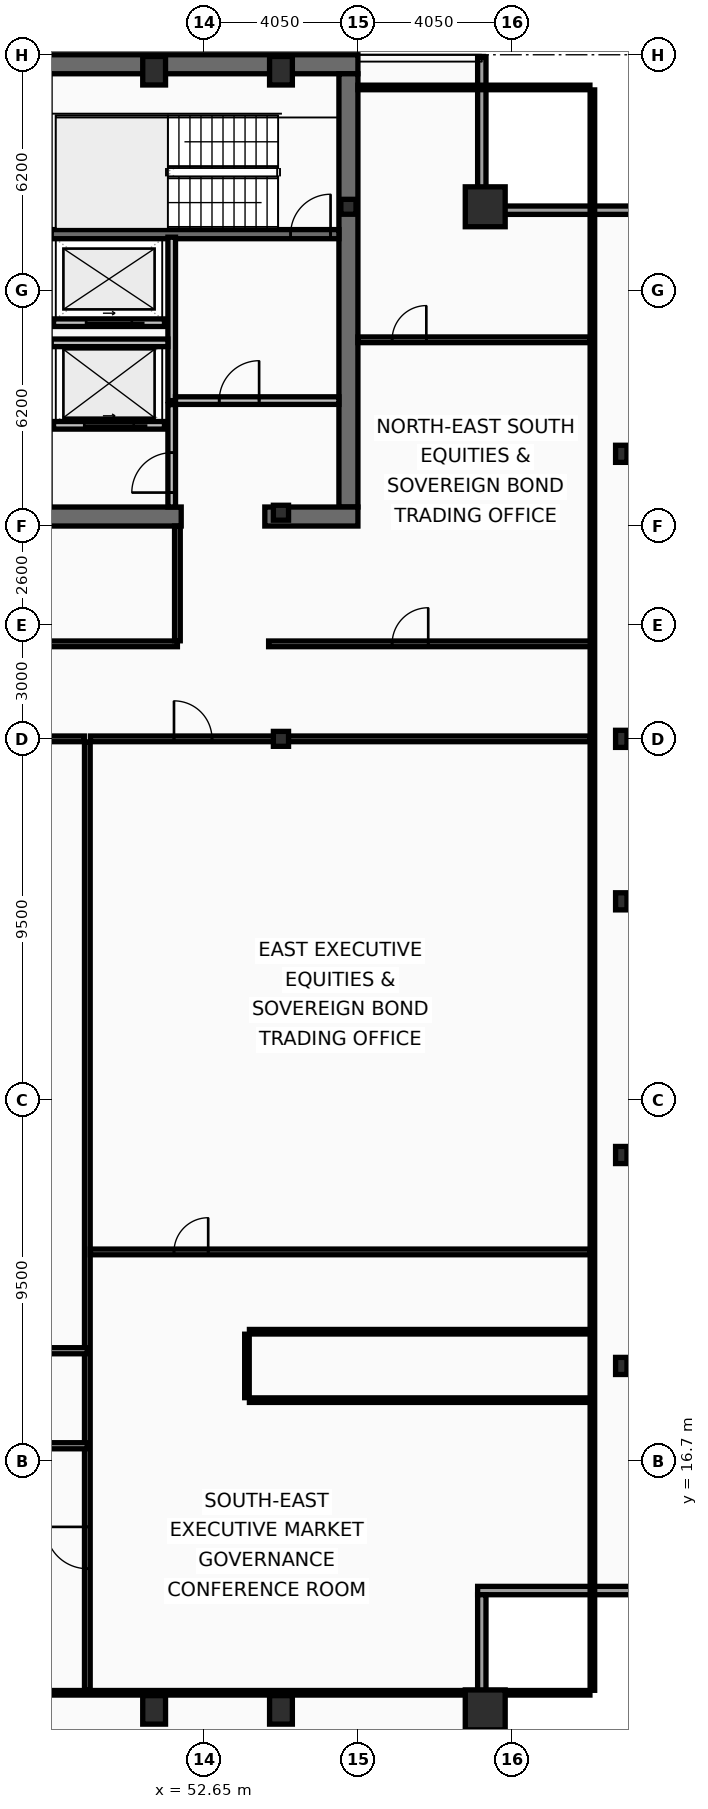
"""IFC4 building model, lengths in metres.
Left out: names, types, materials, properties, quantities, classifications, styles, units other than length and angle.
Written with IfcOpenShell. Run it as: python <this file> out.ifc"""

import sys

from ifc_helpers import new_model, si_unit, direction, frame, frame_2d, origin, origin_2d, place, context, subcontext, project, spatial, rectangle, hollow_rectangle, i_section, extrude, element, fill, save


model = new_model("IFC4")
c1 = context("Model", 3, precision=1e-05, world=origin(), true_north=direction((0.0, 1.0)))
c2 = subcontext(c1, "Body", "Model", "MODEL_VIEW")
j1 = project(units=[si_unit("LENGTHUNIT", "METRE"), si_unit("PLANEANGLEUNIT", "RADIAN")], contexts=[c1])
p1 = place(None, origin())
s1 = spatial("IfcSite", under=j1, at=p1, CompositionType="ELEMENT")
p2 = place(p1, origin())
s2 = spatial("IfcBuilding", under=s1, at=p2, CompositionType="ELEMENT")
p3 = place(p2, frame((0.0, 0.0, 287.8)))
s3 = spatial("IfcBuildingStorey", under=s2, at=p3, CompositionType="ELEMENT", Elevation=287.8)
p4 = place(p3, frame((16.2, 53.45, 0.0), z_axis=(0.0, 0.0, 1.0), x_axis=(1.0, 0.0, 0.0)))
e1 = element("IfcWall", 1, at=p4, inside=s3, PredefinedType="SHEAR", context=c2, shape_type="SweptSolid", body=[
    extrude(rectangle(XDim=40.5, YDim=0.5, at=frame_2d((20.25, 0.0))), origin(), (0.0, 0.0, 1.0), 3.44),
])
p5 = place(p3, frame((56.45, 53.2, 0.0), z_axis=(0.0, 0.0, 1.0), x_axis=(0.0, -1.0, 0.0)))
e2 = element("IfcWall", 2, at=p5, inside=s3, PredefinedType="SHEAR", context=c2, shape_type="SweptSolid", body=[
    extrude(rectangle(XDim=11.4, YDim=0.5, at=frame_2d((5.7, 0.0))), origin(), (0.0, 0.0, 1.0), 3.44),
])
p6 = place(p3, frame((52.05, 41.55, 0.0), z_axis=(0.0, 0.0, 1.0), x_axis=(-1.0, 0.0, 0.0)))
e3 = element("IfcWall", 3, at=p6, inside=s3, PredefinedType="SHEAR", context=c2, shape_type="SweptSolid", body=[
    extrude(rectangle(XDim=11.3, YDim=0.5, at=frame_2d((5.65, 0.0))), origin(), (0.0, 0.0, 1.0), 3.44),
])
p7 = place(p3, frame((56.7, 41.55, 0.0), z_axis=(0.0, 0.0, 1.0), x_axis=(-1.0, 0.0, 0.0)))
e4 = element("IfcWall", 4, at=p7, inside=s3, PredefinedType="SHEAR", context=c2, shape_type="SweptSolid", body=[
    extrude(rectangle(XDim=2.45, YDim=0.5, at=frame_2d((1.225, 0.0))), origin(), (0.0, 0.0, 1.0), 3.44),
])
p8 = place(p3, frame((48.63, 48.98, 0.0), z_axis=(0.0, 0.0, 1.0), x_axis=(1.0, 0.0, 0.0)))
e5 = element("IfcWall", 5, at=p8, inside=s3, PredefinedType="SHEAR", context=c2, shape_type="SweptSolid", body=[
    extrude(rectangle(XDim=7.57, YDim=0.24, at=frame_2d((3.785, 0.0))), origin(), (0.0, 0.0, 1.0), 3.44),
])
p9 = place(p8, frame((6.3, 0.0, 0.0)))
e6 = element("IfcOpeningElement", 6, at=p9, cuts=e5, PredefinedType="OPENING", context=c2, shape_type="SweptSolid", body=[
    extrude(rectangle(XDim=1.05, YDim=2.15, at=frame_2d((0.525, 1.075))), frame((0.0, 0.13, 0.0), z_axis=(0.0, -1.0, 0.0), x_axis=(1.0, 0.0, 0.0)), (0.0, 0.0, 1.0), 0.26),
])
for number, where, z_axis, x_axis in (
    (7, (60.05, 10.15, 0.0), (0.0, 0.0, 1.0), (1.0, 0.0, 0.0)),
    (8, (60.05, 49.7, 0.0), (0.0, 0.0, 1.0), (1.0, 0.0, 0.0)),
):
    element("IfcColumn", number, at=place(p3, frame(where, z_axis=z_axis, x_axis=x_axis)), inside=s3, PredefinedType="COLUMN", context=c2, shape_type="SweptSolid", body=[
        extrude(hollow_rectangle(XDim=1.05, YDim=1.05, WallThickness=0.055, at=origin_2d()), origin(), (0.0, 0.0, 1.0), 3.6),
    ])
for number, where, z_axis, x_axis in (
    (9, (51.337, 10.15, 0.0), (0.0, 0.0, 1.0), (1.0, 0.0, 0.0)),
    (10, (54.675, 10.15, 0.0), (0.0, 0.0, 1.0), (1.0, 0.0, 0.0)),
    (11, (51.337, 53.28, 0.0), (0.0, 0.0, 1.0), (1.0, 0.0, 0.0)),
    (12, (54.675, 53.28, 0.0), (0.0, 0.0, 1.0), (1.0, 0.0, 0.0)),
):
    element("IfcColumn", number, at=place(p3, frame(where, z_axis=z_axis, x_axis=x_axis)), inside=s3, PredefinedType="COLUMN", context=c2, shape_type="SweptSolid", body=[
        extrude(hollow_rectangle(XDim=0.6, YDim=0.75, WallThickness=0.045, at=origin_2d()), origin(), (0.0, 0.0, 1.0), 3.6),
    ])
for number, where, z_axis, x_axis in (
    (13, (63.63, 19.2, 0.0), (0.0, 0.0, 1.0), (1.0, 0.0, 0.0)),
    (14, (63.63, 24.75, 0.0), (0.0, 0.0, 1.0), (1.0, 0.0, 0.0)),
    (15, (63.63, 31.425, 0.0), (0.0, 0.0, 1.0), (1.0, 0.0, 0.0)),
    (16, (63.63, 35.7, 0.0), (0.0, 0.0, 1.0), (1.0, 0.0, 0.0)),
    (17, (63.63, 43.2, 0.0), (0.0, 0.0, 1.0), (1.0, 0.0, 0.0)),
):
    element("IfcColumn", number, at=place(p3, frame(where, z_axis=z_axis, x_axis=x_axis)), inside=s3, PredefinedType="COLUMN", context=c2, shape_type="SweptSolid", body=[
        extrude(i_section(OverallWidth=0.3, OverallDepth=0.45, WebThickness=0.014, FlangeThickness=0.026, at=origin_2d()), origin(), (0.0, 0.0, 1.0), 3.6),
    ])
for number, where, z_axis, x_axis in (
    (18, (56.45, 49.7, 0.0), (0.0, 0.0, 1.0), (1.0, 0.0, 0.0)),
    (19, (54.675, 35.7, 0.0), (0.0, 0.0, 1.0), (1.0, 0.0, 0.0)),
    (20, (54.675, 41.65, 0.0), (0.0, 0.0, 1.0), (1.0, 0.0, 0.0)),
):
    element("IfcColumn", number, at=place(p3, frame(where, z_axis=z_axis, x_axis=x_axis)), inside=s3, PredefinedType="COLUMN", context=c2, shape_type="SweptSolid", body=[
        extrude(i_section(OverallWidth=0.399, OverallDepth=0.393, WebThickness=0.023, FlangeThickness=0.037, at=origin_2d()), origin(), (0.0, 0.0, 1.0), 3.6),
    ])
p10 = place(p3, frame((59.96, 53.63, 0.0), z_axis=(0.0, 0.0, 1.0), x_axis=(0.0, -1.0, 0.0)))
e21 = element("IfcWall", 21, at=p10, inside=s3, PredefinedType="SOLIDWALL", context=c2, shape_type="SweptSolid", body=[
    extrude(rectangle(XDim=3.91, YDim=0.22, at=frame_2d((1.955, 0.0))), origin(), (0.0, 0.0, 1.0), 2.09),
])
p11 = place(p3, frame((59.85, 49.61, 0.0), z_axis=(0.0, 0.0, 1.0), x_axis=(1.0, 0.0, 0.0)))
e22 = element("IfcWall", 22, at=p11, inside=s3, PredefinedType="SOLIDWALL", context=c2, shape_type="SweptSolid", body=[
    extrude(rectangle(XDim=4.13, YDim=0.22, at=frame_2d((2.065, 0.0))), origin(), (0.0, 0.0, 1.0), 2.09),
])
p12 = place(p3, frame((63.98, 13.29, 0.0), z_axis=(0.0, 0.0, 1.0), x_axis=(-1.0, 0.0, 0.0)))
e23 = element("IfcWall", 23, at=p12, inside=s3, PredefinedType="SOLIDWALL", context=c2, shape_type="SweptSolid", body=[
    extrude(rectangle(XDim=4.13, YDim=0.22, at=frame_2d((2.065, 0.0))), origin(), (0.0, 0.0, 1.0), 2.88),
])
p13 = place(p3, frame((59.96, 13.18, 0.0), z_axis=(0.0, 0.0, 1.0), x_axis=(0.0, -1.0, 0.0)))
e24 = element("IfcWall", 24, at=p13, inside=s3, PredefinedType="SOLIDWALL", context=c2, shape_type="SweptSolid", body=[
    extrude(rectangle(XDim=3.91, YDim=0.22, at=frame_2d((1.955, 0.0))), origin(), (0.0, 0.0, 1.0), 2.09),
])
p14 = place(p3, frame((51.61, 43.95, 0.0), z_axis=(0.0, 0.0, 1.0), x_axis=(-1.0, 0.0, 0.0)))
e25 = element("IfcWall", 25, at=p14, inside=s3, PredefinedType="PARTITIONING", context=c2, shape_type="SweptSolid", body=[
    extrude(rectangle(XDim=2.92, YDim=0.2, at=frame_2d((1.46, 0.0))), origin(), (0.0, 0.0, 1.0), 3.44),
])
p15 = place(p14, frame((0.81, 0.0, 0.0)))
e26 = element("IfcOpeningElement", 26, at=p15, cuts=e25, PredefinedType="OPENING", context=c2, shape_type="SweptSolid", body=[
    extrude(rectangle(XDim=1.3, YDim=2.18, at=frame_2d((0.65, 1.09))), frame((0.0, 0.11, 0.0), z_axis=(0.0, -1.0, 0.0), x_axis=(1.0, 0.0, 0.0)), (0.0, 0.0, 1.0), 0.22),
])
p16 = place(p3, frame((51.61, 46.65, 0.0), z_axis=(0.0, 0.0, 1.0), x_axis=(-1.0, 0.0, 0.0)))
e27 = element("IfcWall", 27, at=p16, inside=s3, PredefinedType="PARTITIONING", context=c2, shape_type="SweptSolid", body=[
    extrude(rectangle(XDim=2.92, YDim=0.2, at=frame_2d((1.46, 0.0))), origin(), (0.0, 0.0, 1.0), 3.44),
])
p17 = place(p16, frame((0.86, 0.0, 0.0)))
e28 = element("IfcOpeningElement", 28, at=p17, cuts=e27, PredefinedType="OPENING", context=c2, shape_type="SweptSolid", body=[
    extrude(rectangle(XDim=1.2, YDim=2.18, at=frame_2d((0.6, 1.09))), frame((0.0, 0.11, 0.0), z_axis=(0.0, -1.0, 0.0), x_axis=(1.0, 0.0, 0.0)), (0.0, 0.0, 1.0), 0.22),
])
p18 = place(p3, frame((51.8, 44.6, 0.0), z_axis=(0.0, 0.0, 1.0), x_axis=(0.0, 1.0, 0.0)))
e29 = element("IfcWall", 29, at=p18, inside=s3, PredefinedType="PARTITIONING", context=c2, shape_type="SweptSolid", body=[
    extrude(rectangle(XDim=4.3, YDim=0.2, at=frame_2d((2.15, 0.0))), origin(), (0.0, 0.0, 1.0), 3.44),
])
p19 = place(p3, frame((51.9, 44.6, 0.0), z_axis=(0.0, 0.0, 1.0), x_axis=(1.0, 0.0, 0.0)))
e30 = element("IfcWall", 30, at=p19, inside=s3, PredefinedType="PARTITIONING", context=c2, shape_type="SweptSolid", body=[
    extrude(rectangle(XDim=4.3, YDim=0.2, at=frame_2d((2.15, 0.0))), origin(), (0.0, 0.0, 1.0), 3.44),
])
p20 = place(p19, frame((1.15, 0.0, 0.0)))
e31 = element("IfcOpeningElement", 31, at=p20, cuts=e30, PredefinedType="OPENING", context=c2, shape_type="SweptSolid", body=[
    extrude(rectangle(XDim=1.05, YDim=2.15, at=frame_2d((0.525, 1.075))), frame((0.0, 0.11, 0.0), z_axis=(0.0, -1.0, 0.0), x_axis=(1.0, 0.0, 0.0)), (0.0, 0.0, 1.0), 0.22),
])
p21 = place(p3, frame((48.63, 46.12, 0.0), z_axis=(0.0, 0.0, 1.0), x_axis=(1.0, 0.0, 0.0)))
e32 = element("IfcWall", 32, at=p21, inside=s3, PredefinedType="PARTITIONING", context=c2, shape_type="SweptSolid", body=[
    extrude(rectangle(XDim=3.07, YDim=0.2, at=frame_2d((1.535, 0.0))), origin(), (0.0, 0.0, 1.0), 3.44),
])
p22 = place(p3, frame((51.8, 41.8, 0.0), z_axis=(0.0, 0.0, 1.0), x_axis=(0.0, 1.0, 0.0)))
e33 = element("IfcWall", 33, at=p22, inside=s3, PredefinedType="PARTITIONING", context=c2, shape_type="SweptSolid", body=[
    extrude(rectangle(XDim=2.695, YDim=0.2, at=frame_2d((1.348, 0.0))), origin(), (0.0, 0.0, 1.0), 3.44),
])
p23 = place(p22, frame((0.38, 0.0, 0.0)))
e34 = element("IfcOpeningElement", 34, at=p23, cuts=e33, PredefinedType="OPENING", context=c2, shape_type="SweptSolid", body=[
    extrude(rectangle(XDim=1.05, YDim=2.15, at=frame_2d((0.525, 1.075))), frame((0.0, 0.11, 0.0), z_axis=(0.0, -1.0, 0.0), x_axis=(1.0, 0.0, 0.0)), (0.0, 0.0, 1.0), 0.22),
])
p24 = place(p3, frame((46.3, 38.2, 0.0), z_axis=(0.0, 0.0, 1.0), x_axis=(1.0, 0.0, 0.0)))
e35 = element("IfcWall", 35, at=p24, inside=s3, PredefinedType="PARTITIONING", context=c2, shape_type="SweptSolid", body=[
    extrude(rectangle(XDim=5.65, YDim=0.15, at=frame_2d((2.825, 0.0))), origin(), (0.0, 0.0, 1.0), 2.78),
])
p25 = place(p24, frame((1.1, 0.0, 0.0)))
e36 = element("IfcOpeningElement", 36, at=p25, cuts=e35, PredefinedType="OPENING", context=c2, shape_type="SweptSolid", body=[
    extrude(rectangle(XDim=1.0, YDim=2.05, at=frame_2d((0.5, 1.025))), frame((0.0, 0.085, 0.0), z_axis=(0.0, -1.0, 0.0), x_axis=(1.0, 0.0, 0.0)), (0.0, 0.0, 1.0), 0.17),
])
p26 = place(p3, frame((51.95, 38.28, 0.0), z_axis=(0.0, 0.0, 1.0), x_axis=(0.0, 1.0, 0.0)))
e37 = element("IfcWall", 37, at=p26, inside=s3, PredefinedType="PARTITIONING", context=c2, shape_type="SweptSolid", body=[
    extrude(rectangle(XDim=3.02, YDim=0.15, at=frame_2d((1.51, 0.0))), origin(), (0.0, 0.0, 1.0), 3.44),
])
p27 = place(p3, frame((54.35, 38.2, 0.0), z_axis=(0.0, 0.0, 1.0), x_axis=(1.0, 0.0, 0.0)))
e38 = element("IfcWall", 38, at=p27, inside=s3, PredefinedType="PARTITIONING", context=c2, shape_type="SweptSolid", body=[
    extrude(rectangle(XDim=8.52, YDim=0.15, at=frame_2d((4.26, 0.0))), origin(), (0.0, 0.0, 1.0), 2.78),
])
p28 = place(p27, frame((3.25, 0.0, 0.0)))
e39 = element("IfcOpeningElement", 39, at=p28, cuts=e38, PredefinedType="OPENING", context=c2, shape_type="SweptSolid", body=[
    extrude(rectangle(XDim=0.95, YDim=2.05, at=frame_2d((0.475, 1.025))), frame((0.0, 0.085, 0.0), z_axis=(0.0, -1.0, 0.0), x_axis=(1.0, 0.0, 0.0)), (0.0, 0.0, 1.0), 0.17),
])
p29 = place(p3, frame((56.7, 46.2, 0.0), z_axis=(0.0, 0.0, 1.0), x_axis=(1.0, 0.0, 0.0)))
e40 = element("IfcWall", 40, at=p29, inside=s3, PredefinedType="PARTITIONING", context=c2, shape_type="SweptSolid", body=[
    extrude(rectangle(XDim=6.105, YDim=0.15, at=frame_2d((3.052, 0.0))), origin(), (0.0, 0.0, 1.0), 2.88),
])
p30 = place(p29, frame((0.9, 0.0, 0.0)))
e41 = element("IfcOpeningElement", 41, at=p30, cuts=e40, PredefinedType="OPENING", context=c2, shape_type="SweptSolid", body=[
    extrude(rectangle(XDim=0.9, YDim=2.05, at=frame_2d((0.45, 1.025))), frame((0.0, 0.085, 0.0), z_axis=(0.0, -1.0, 0.0), x_axis=(1.0, 0.0, 0.0)), (0.0, 0.0, 1.0), 0.17),
])
p31 = place(p3, frame((49.58, 10.665, 0.0), z_axis=(0.0, 0.0, 1.0), x_axis=(0.0, 1.0, 0.0)))
e42 = element("IfcWall", 42, at=p31, inside=s3, PredefinedType="PARTITIONING", context=c2, shape_type="SweptSolid", body=[
    extrude(rectangle(XDim=24.955, YDim=0.15, at=frame_2d((12.478, 0.0))), origin(), (0.0, 0.0, 1.0), 3.03),
])
p32 = place(p31, frame((3.2, 0.0, 0.0)))
e43 = element("IfcOpeningElement", 43, at=p32, cuts=e42, PredefinedType="OPENING", context=c2, shape_type="SweptSolid", body=[
    extrude(rectangle(XDim=1.1, YDim=2.1, at=frame_2d((0.55, 1.05))), frame((0.0, 0.085, 0.0), z_axis=(0.0, -1.0, 0.0), x_axis=(1.0, 0.0, 0.0)), (0.0, 0.0, 1.0), 0.17),
])
p33 = place(p3, frame((24.48, 35.7, 0.0), z_axis=(0.0, 0.0, 1.0), x_axis=(1.0, 0.0, 0.0)))
e44 = element("IfcWall", 44, at=p33, inside=s3, PredefinedType="PARTITIONING", context=c2, shape_type="SweptSolid", body=[
    extrude(rectangle(XDim=25.02, YDim=0.15, at=frame_2d((12.51, 0.0))), origin(), (0.0, 0.0, 1.0), 2.78),
])
p34 = place(p3, frame((49.66, 35.7, 0.0), z_axis=(0.0, 0.0, 1.0), x_axis=(1.0, 0.0, 0.0)))
e45 = element("IfcWall", 45, at=p34, inside=s3, PredefinedType="PARTITIONING", context=c2, shape_type="SweptSolid", body=[
    extrude(rectangle(XDim=13.145, YDim=0.15, at=frame_2d((6.573, 0.0))), origin(), (0.0, 0.0, 1.0), 2.09),
])
p35 = place(p34, frame((2.2, 0.0, 0.0)))
e46 = element("IfcOpeningElement", 46, at=p35, cuts=e45, PredefinedType="OPENING", context=c2, shape_type="SweptSolid", body=[
    extrude(rectangle(XDim=1.0, YDim=2.05, at=frame_2d((0.5, 1.025))), frame((0.0, 0.085, 0.0), z_axis=(0.0, -1.0, 0.0), x_axis=(1.0, 0.0, 0.0)), (0.0, 0.0, 1.0), 0.17),
])
p36 = place(p3, frame((49.66, 22.2, 0.0), z_axis=(0.0, 0.0, 1.0), x_axis=(1.0, 0.0, 0.0)))
e47 = element("IfcWall", 47, at=p36, inside=s3, PredefinedType="PARTITIONING", context=c2, shape_type="SweptSolid", body=[
    extrude(rectangle(XDim=13.145, YDim=0.15, at=frame_2d((6.573, 0.0))), origin(), (0.0, 0.0, 1.0), 2.53),
])
p37 = place(p36, frame((2.2, 0.0, 0.0)))
e48 = element("IfcOpeningElement", 48, at=p37, cuts=e47, PredefinedType="OPENING", context=c2, shape_type="SweptSolid", body=[
    extrude(rectangle(XDim=0.9, YDim=2.05, at=frame_2d((0.45, 1.025))), frame((0.0, 0.085, 0.0), z_axis=(0.0, -1.0, 0.0), x_axis=(1.0, 0.0, 0.0)), (0.0, 0.0, 1.0), 0.17),
])
p38 = place(p3, frame((40.855, 19.6, 0.0), z_axis=(0.0, 0.0, 1.0), x_axis=(1.0, 0.0, 0.0)))
e49 = element("IfcWall", 49, at=p38, inside=s3, PredefinedType="PARTITIONING", context=c2, shape_type="SweptSolid", body=[
    extrude(rectangle(XDim=8.725, YDim=0.16, at=frame_2d((4.363, 0.0))), origin(), (0.0, 0.0, 1.0), 2.78),
])
p39 = place(p38, frame((4.165, 0.0, 0.0)))
e50 = element("IfcOpeningElement", 50, at=p39, cuts=e49, PredefinedType="OPENING", context=c2, shape_type="SweptSolid", body=[
    extrude(rectangle(XDim=1.0, YDim=2.05, at=frame_2d((0.5, 1.025))), frame((0.0, 0.09, 0.0), z_axis=(0.0, -1.0, 0.0), x_axis=(1.0, 0.0, 0.0)), (0.0, 0.0, 1.0), 0.18),
])
p40 = place(p3, frame((39.024, 17.1, 0.0), z_axis=(0.0, 0.0, 1.0), x_axis=(1.0, 0.0, 0.0)))
e51 = element("IfcWall", 51, at=p40, inside=s3, PredefinedType="PARTITIONING", context=c2, shape_type="SweptSolid", body=[
    extrude(rectangle(XDim=10.556, YDim=0.16, at=frame_2d((5.278, 0.0))), origin(), (0.0, 0.0, 1.0), 2.78),
])
p41 = place(p40, frame((4.934, 0.0, 0.0)))
e52 = element("IfcOpeningElement", 52, at=p41, cuts=e51, PredefinedType="OPENING", context=c2, shape_type="SweptSolid", body=[
    extrude(rectangle(XDim=1.0, YDim=2.05, at=frame_2d((0.5, 1.025))), frame((0.0, 0.09, 0.0), z_axis=(0.0, -1.0, 0.0), x_axis=(1.0, 0.0, 0.0)), (0.0, 0.0, 1.0), 0.18),
])
p42 = place(p3, frame((62.87, 10.665, 0.0), z_axis=(0.0, 0.0, 1.0), x_axis=(0.0, 1.0, 0.0)))
e53 = element("IfcWall", 53, at=p42, inside=s3, PredefinedType="PARTITIONING", context=c2, shape_type="SweptSolid", body=[
    extrude(rectangle(XDim=42.11, YDim=0.12, at=frame_2d((21.055, 0.0))), origin(), (0.0, 0.0, 1.0), 1.83),
])
p43 = place(p3, frame((56.7, 52.84, 0.0), z_axis=(0.0, 0.0, 1.0), x_axis=(1.0, 0.0, 0.0)))
e54 = element("IfcWall", 54, at=p43, inside=s3, PredefinedType="PARTITIONING", context=c2, shape_type="SweptSolid", body=[
    extrude(rectangle(XDim=6.105, YDim=0.12, at=frame_2d((3.052, 0.0))), origin(), (0.0, 0.0, 1.0), 3.44),
])
p44 = place(p3, frame((10.095, 10.6, 0.0), z_axis=(0.0, 0.0, 1.0), x_axis=(1.0, 0.0, 0.0)))
e55 = element("IfcWall", 55, at=p44, inside=s3, PredefinedType="PARTITIONING", context=c2, shape_type="SweptSolid", body=[
    extrude(rectangle(XDim=52.71, YDim=0.12, at=frame_2d((26.355, 0.0))), origin(), (0.0, 0.0, 1.0), 2.09),
])
for number, where, z_axis, x_axis in (
    (56, (53.845, 18.3, 0.0), (0.0, 0.0, 1.0), (1.0, 0.0, 0.0)),
    (57, (53.845, 20.1, 0.0), (0.0, 0.0, 1.0), (1.0, 0.0, 0.0)),
):
    element("IfcWall", number, at=place(p3, frame(where, z_axis=z_axis, x_axis=x_axis)), inside=s3, PredefinedType="PARTITIONING", context=c2, shape_type="SweptSolid", body=[
        extrude(rectangle(XDim=8.96, YDim=0.12, at=frame_2d((4.48, 0.0))), origin(), (0.0, 0.0, 1.0), 2.53),
    ])
p45 = place(p3, frame((53.78, 18.365, 0.0), z_axis=(0.0, 0.0, 1.0), x_axis=(0.0, 1.0, 0.0)))
e58 = element("IfcWall", 58, at=p45, inside=s3, PredefinedType="PARTITIONING", context=c2, shape_type="SweptSolid", body=[
    extrude(rectangle(XDim=1.67, YDim=0.12, at=frame_2d((0.835, 0.0))), origin(), (0.0, 0.0, 1.0), 3.44),
])
p46 = place(p9, origin())
e59 = element("IfcDoor", 59, at=p46, inside=s3, OperationType="SINGLE_SWING_RIGHT", PredefinedType="DOOR", context=c2, shape_type="SweptSolid", body=[
    extrude(rectangle(XDim=1.05, YDim=2.15, at=frame_2d((0.525, 1.075))), frame((0.0, 0.025, 0.0), z_axis=(0.0, -1.0, 0.0), x_axis=(1.0, 0.0, 0.0)), (0.0, 0.0, 1.0), 0.05),
])
fill(e6, e59)
p47 = place(p15, origin())
e60 = element("IfcDoor", 60, at=p47, inside=s3, OperationType="SLIDING_TO_LEFT", PredefinedType="DOOR", context=c2, shape_type="SweptSolid", body=[
    extrude(rectangle(XDim=1.3, YDim=2.18, at=frame_2d((0.65, 1.09))), frame((0.0, 0.025, 0.0), z_axis=(0.0, -1.0, 0.0), x_axis=(1.0, 0.0, 0.0)), (0.0, 0.0, 1.0), 0.05),
])
fill(e26, e60)
p48 = place(p17, origin())
e61 = element("IfcDoor", 61, at=p48, inside=s3, OperationType="SLIDING_TO_LEFT", PredefinedType="DOOR", context=c2, shape_type="SweptSolid", body=[
    extrude(rectangle(XDim=1.2, YDim=2.18, at=frame_2d((0.6, 1.09))), frame((0.0, 0.025, 0.0), z_axis=(0.0, -1.0, 0.0), x_axis=(1.0, 0.0, 0.0)), (0.0, 0.0, 1.0), 0.05),
])
fill(e28, e61)
p49 = place(p20, origin())
e62 = element("IfcDoor", 62, at=p49, inside=s3, OperationType="SINGLE_SWING_RIGHT", PredefinedType="DOOR", context=c2, shape_type="SweptSolid", body=[
    extrude(rectangle(XDim=1.05, YDim=2.15, at=frame_2d((0.525, 1.075))), frame((0.0, 0.025, 0.0), z_axis=(0.0, -1.0, 0.0), x_axis=(1.0, 0.0, 0.0)), (0.0, 0.0, 1.0), 0.05),
])
fill(e31, e62)
p50 = place(p23, origin())
e63 = element("IfcDoor", 63, at=p50, inside=s3, OperationType="SINGLE_SWING_LEFT", PredefinedType="DOOR", context=c2, shape_type="SweptSolid", body=[
    extrude(rectangle(XDim=1.05, YDim=2.15, at=frame_2d((0.525, 1.075))), frame((0.0, 0.025, 0.0), z_axis=(0.0, -1.0, 0.0), x_axis=(1.0, 0.0, 0.0)), (0.0, 0.0, 1.0), 0.05),
])
fill(e34, e63)
p51 = place(p28, origin())
e64 = element("IfcDoor", 64, at=p51, inside=s3, OperationType="SINGLE_SWING_RIGHT", PredefinedType="DOOR", context=c2, shape_type="SweptSolid", body=[
    extrude(rectangle(XDim=0.95, YDim=2.05, at=frame_2d((0.475, 1.025))), frame((0.0, 0.025, 0.0), z_axis=(0.0, -1.0, 0.0), x_axis=(1.0, 0.0, 0.0)), (0.0, 0.0, 1.0), 0.05),
])
fill(e39, e64)
p52 = place(p30, origin())
e65 = element("IfcDoor", 65, at=p52, inside=s3, OperationType="SINGLE_SWING_RIGHT", PredefinedType="DOOR", context=c2, shape_type="SweptSolid", body=[
    extrude(rectangle(XDim=0.9, YDim=2.05, at=frame_2d((0.45, 1.025))), frame((0.0, 0.025, 0.0), z_axis=(0.0, -1.0, 0.0), x_axis=(1.0, 0.0, 0.0)), (0.0, 0.0, 1.0), 0.05),
])
fill(e41, e65)
p53 = place(p32, origin())
e66 = element("IfcDoor", 66, at=p53, inside=s3, OperationType="SINGLE_SWING_RIGHT", PredefinedType="DOOR", context=c2, shape_type="SweptSolid", body=[
    extrude(rectangle(XDim=1.1, YDim=2.1, at=frame_2d((0.55, 1.05))), frame((0.0, 0.025, 0.0), z_axis=(0.0, -1.0, 0.0), x_axis=(1.0, 0.0, 0.0)), (0.0, 0.0, 1.0), 0.05),
])
fill(e43, e66)
p54 = place(p35, origin())
e67 = element("IfcDoor", 67, at=p54, inside=s3, OperationType="SINGLE_SWING_LEFT", PredefinedType="DOOR", context=c2, shape_type="SweptSolid", body=[
    extrude(rectangle(XDim=1.0, YDim=2.05, at=frame_2d((0.5, 1.025))), frame((0.0, 0.025, 0.0), z_axis=(0.0, -1.0, 0.0), x_axis=(1.0, 0.0, 0.0)), (0.0, 0.0, 1.0), 0.05),
])
fill(e46, e67)
p55 = place(p37, origin())
e68 = element("IfcDoor", 68, at=p55, inside=s3, OperationType="SINGLE_SWING_RIGHT", PredefinedType="DOOR", context=c2, shape_type="SweptSolid", body=[
    extrude(rectangle(XDim=0.9, YDim=2.05, at=frame_2d((0.45, 1.025))), frame((0.0, 0.025, 0.0), z_axis=(0.0, -1.0, 0.0), x_axis=(1.0, 0.0, 0.0)), (0.0, 0.0, 1.0), 0.05),
])
fill(e48, e68)
save(model, sys.argv[1])
